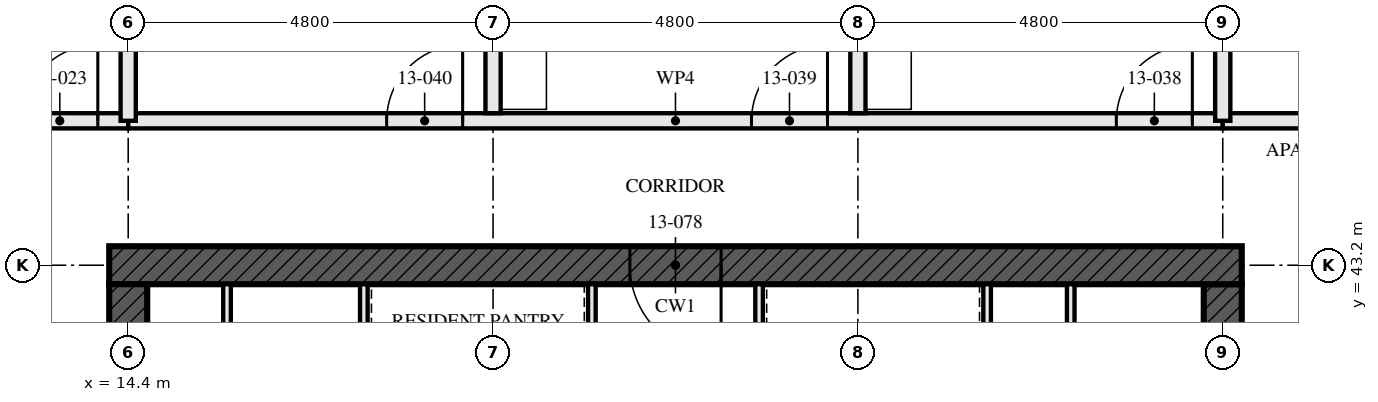
"""IFC4 building model, lengths in metres.
Left out: names, types, materials, properties, quantities, classifications, styles, units other than length and angle.
Written with IfcOpenShell. Run it as: python <this file> out.ifc"""

import sys

from ifc_helpers import new_model, si_unit, direction, frame, frame_2d, origin, place, context, subcontext, project, spatial, rectangle, extrude, element, fill, save


model = new_model("IFC4")
c1 = context("Model", 3, precision=1e-05, world=origin(), true_north=direction((0.0, 1.0)))
c2 = subcontext(c1, "Body", "Model", "MODEL_VIEW")
j1 = project(units=[si_unit("LENGTHUNIT", "METRE"), si_unit("PLANEANGLEUNIT", "RADIAN")], contexts=[c1])
p1 = place(None, origin())
s1 = spatial("IfcSite", under=j1, at=p1, CompositionType="ELEMENT")
p2 = place(p1, origin())
s2 = spatial("IfcBuilding", under=s1, at=p2, CompositionType="ELEMENT")
p3 = place(p2, frame((0.0, 0.0, 51.5)))
s3 = spatial("IfcBuildingStorey", under=s2, at=p3, CompositionType="ELEMENT", Elevation=51.5)
p4 = place(p3, frame((29.05, 43.2, -0.17), z_axis=(0.0, 0.0, 1.0), x_axis=(-1.0, 0.0, 0.0)))
e1 = element("IfcWall", 1, at=p4, inside=s3, PredefinedType="SHEAR", context=c2, shape_type="SweptSolid", body=[
    extrude(rectangle(XDim=14.9, YDim=0.5, at=frame_2d((7.45, 0.0))), origin(), (0.0, 0.0, 1.0), 3.5),
])
p5 = place(p4, frame((6.85, 0.0, 0.17)))
e2 = element("IfcOpeningElement", 2, at=p5, cuts=e1, PredefinedType="OPENING", context=c2, shape_type="SweptSolid", body=[
    extrude(rectangle(XDim=1.2, YDim=2.1, at=frame_2d((0.6, 1.05))), frame((0.0, 0.26, 0.0), z_axis=(0.0, -1.0, 0.0), x_axis=(1.0, 0.0, 0.0)), (0.0, 0.0, 1.0), 0.521),
])
p6 = place(p3, frame((14.4, 42.95, -0.17), z_axis=(0.0, 0.0, 1.0), x_axis=(0.0, -1.0, 0.0)))
e3 = element("IfcWall", 3, at=p6, inside=s3, PredefinedType="SHEAR", context=c2, shape_type="SweptSolid", body=[
    extrude(rectangle(XDim=13.9, YDim=0.5, at=frame_2d((6.95, 0.0))), origin(), (0.0, 0.0, 1.0), 3.5),
])
p7 = place(p6, frame((6.35, 0.0, 0.17)))
e4 = element("IfcOpeningElement", 4, at=p7, cuts=e3, PredefinedType="OPENING", context=c2, shape_type="SweptSolid", body=[
    extrude(rectangle(XDim=1.2, YDim=2.1, at=frame_2d((0.6, 1.05))), frame((0.0, 0.26, 0.0), z_axis=(0.0, -1.0, 0.0), x_axis=(1.0, 0.0, 0.0)), (0.0, 0.0, 1.0), 0.521),
])
p8 = place(p3, frame((28.8, 29.05, -0.17), z_axis=(0.0, 0.0, 1.0), x_axis=(0.0, 1.0, 0.0)))
e5 = element("IfcWall", 5, at=p8, inside=s3, PredefinedType="SHEAR", context=c2, shape_type="SweptSolid", body=[
    extrude(rectangle(XDim=13.9, YDim=0.5, at=frame_2d((6.95, 0.0))), origin(), (0.0, 0.0, 1.0), 3.5),
])
p9 = place(p8, frame((6.35, 0.0, 0.17)))
e6 = element("IfcOpeningElement", 6, at=p9, cuts=e5, PredefinedType="OPENING", context=c2, shape_type="SweptSolid", body=[
    extrude(rectangle(XDim=1.2, YDim=2.1, at=frame_2d((0.6, 1.05))), frame((0.0, 0.26, 0.0), z_axis=(0.0, -1.0, 0.0), x_axis=(1.0, 0.0, 0.0)), (0.0, 0.0, 1.0), 0.521),
])
p10 = place(p3, frame((14.4, 45.1, 0.0), z_axis=(0.0, 0.0, 1.0), x_axis=(-1.0, 0.0, 0.0)))
e7 = element("IfcWall", 7, at=p10, inside=s3, PredefinedType="PARTITIONING", context=c2, shape_type="SweptSolid", body=[
    extrude(rectangle(XDim=9.6, YDim=0.2, at=frame_2d((4.8, 0.0))), origin(), (0.0, 0.0, 1.0), 3.33),
])
p11 = place(p10, frame((0.4, 0.0, 0.0)))
e8 = element("IfcOpeningElement", 8, at=p11, cuts=e7, PredefinedType="OPENING", context=c2, shape_type="SweptSolid", body=[
    extrude(rectangle(XDim=1.0, YDim=2.1, at=frame_2d((0.5, 1.05))), frame((0.0, 0.111, 0.0), z_axis=(0.0, -1.0, 0.0), x_axis=(1.0, 0.0, 0.0)), (0.0, 0.0, 1.0), 0.221),
])
for number, where, z_axis, x_axis in (
    (9, (24.0, 57.28, 0.0), (0.0, 0.0, 1.0), (0.0, -1.0, 0.0)),
    (10, (19.2, 57.28, 0.0), (0.0, 0.0, 1.0), (0.0, -1.0, 0.0)),
):
    element("IfcWall", number, at=place(p3, frame(where, z_axis=z_axis, x_axis=x_axis)), inside=s3, PredefinedType="PARTITIONING", context=c2, shape_type="SweptSolid", body=[
        extrude(rectangle(XDim=12.08, YDim=0.2, at=frame_2d((6.04, 0.0))), origin(), (0.0, 0.0, 1.0), 2.55),
    ])
p12 = place(p3, frame((28.8, 45.1, 0.0), z_axis=(0.0, 0.0, 1.0), x_axis=(-1.0, 0.0, 0.0)))
e11 = element("IfcWall", 11, at=p12, inside=s3, PredefinedType="PARTITIONING", context=c2, shape_type="SweptSolid", body=[
    extrude(rectangle(XDim=14.4, YDim=0.2, at=frame_2d((7.2, 0.0))), origin(), (0.0, 0.0, 1.0), 3.33),
])
p13 = place(p12, frame((0.4, 0.0, 0.0)))
e12 = element("IfcOpeningElement", 12, at=p13, cuts=e11, PredefinedType="OPENING", context=c2, shape_type="SweptSolid", body=[
    extrude(rectangle(XDim=1.0, YDim=2.1, at=frame_2d((0.5, 1.05))), frame((0.0, 0.111, 0.0), z_axis=(0.0, -1.0, 0.0), x_axis=(1.0, 0.0, 0.0)), (0.0, 0.0, 1.0), 0.221),
])
p14 = place(p12, frame((5.2, 0.0, 0.0)))
e13 = element("IfcOpeningElement", 13, at=p14, cuts=e11, PredefinedType="OPENING", context=c2, shape_type="SweptSolid", body=[
    extrude(rectangle(XDim=1.0, YDim=2.1, at=frame_2d((0.5, 1.05))), frame((0.0, 0.111, 0.0), z_axis=(0.0, -1.0, 0.0), x_axis=(1.0, 0.0, 0.0)), (0.0, 0.0, 1.0), 0.221),
])
p15 = place(p12, frame((10.0, 0.0, 0.0)))
e14 = element("IfcOpeningElement", 14, at=p15, cuts=e11, PredefinedType="OPENING", context=c2, shape_type="SweptSolid", body=[
    extrude(rectangle(XDim=1.0, YDim=2.1, at=frame_2d((0.5, 1.05))), frame((0.0, 0.111, 0.0), z_axis=(0.0, -1.0, 0.0), x_axis=(1.0, 0.0, 0.0)), (0.0, 0.0, 1.0), 0.221),
])
p16 = place(p3, frame((38.4, 45.1, 0.0), z_axis=(0.0, 0.0, 1.0), x_axis=(-1.0, 0.0, 0.0)))
e15 = element("IfcWall", 15, at=p16, inside=s3, PredefinedType="PARTITIONING", context=c2, shape_type="SweptSolid", body=[
    extrude(rectangle(XDim=9.6, YDim=0.2, at=frame_2d((4.8, 0.0))), origin(), (0.0, 0.0, 1.0), 3.33),
])
p17 = place(p16, frame((0.4, 0.0, 0.0)))
e16 = element("IfcOpeningElement", 16, at=p17, cuts=e15, PredefinedType="OPENING", context=c2, shape_type="SweptSolid", body=[
    extrude(rectangle(XDim=1.0, YDim=2.1, at=frame_2d((0.5, 1.05))), frame((0.0, 0.111, 0.0), z_axis=(0.0, -1.0, 0.0), x_axis=(1.0, 0.0, 0.0)), (0.0, 0.0, 1.0), 0.221),
])
for number, where, z_axis, x_axis in (
    (17, (15.7, 37.15, 0.0), (0.0, 0.0, 1.0), (0.0, 1.0, 0.0)),
    (18, (26.8, 37.15, 0.0), (0.0, 0.0, 1.0), (0.0, 1.0, 0.0)),
):
    element("IfcWall", number, at=place(p3, frame(where, z_axis=z_axis, x_axis=x_axis)), inside=s3, PredefinedType="SOLIDWALL", context=c2, shape_type="SweptSolid", body=[
        extrude(rectangle(XDim=5.8, YDim=0.1, at=frame_2d((2.9, 0.0))), origin(), (0.0, 0.0, 1.0), 3.33),
    ])
p18 = place(p3, frame((20.5, 37.15, 0.0), z_axis=(0.0, 0.0, 1.0), x_axis=(0.0, 1.0, 0.0)))
e19 = element("IfcWall", 19, at=p18, inside=s3, PredefinedType="SOLIDWALL", context=c2, shape_type="SweptSolid", body=[
    extrude(rectangle(XDim=5.8, YDim=0.1, at=frame_2d((2.9, 0.0))), origin(), (0.0, 0.0, 1.0), 3.33),
])
p19 = place(p18, frame((0.925, 0.0, 0.0)))
e20 = element("IfcOpeningElement", 20, at=p19, cuts=e19, PredefinedType="OPENING", context=c2, shape_type="SweptSolid", body=[
    extrude(rectangle(XDim=1.0, YDim=2.1, at=frame_2d((0.5, 1.05))), frame((0.0, 0.061, 0.0), z_axis=(0.0, -1.0, 0.0), x_axis=(1.0, 0.0, 0.0)), (0.0, 0.0, 1.0), 0.121),
])
p20 = place(p18, frame((3.9, 0.0, 0.0)))
e21 = element("IfcOpeningElement", 21, at=p20, cuts=e19, PredefinedType="OPENING", context=c2, shape_type="SweptSolid", body=[
    extrude(rectangle(XDim=1.0, YDim=2.1, at=frame_2d((0.5, 1.05))), frame((0.0, 0.061, 0.0), z_axis=(0.0, -1.0, 0.0), x_axis=(1.0, 0.0, 0.0)), (0.0, 0.0, 1.0), 0.121),
])
for number, where, z_axis, x_axis in (
    (22, (22.7, 37.15, 0.0), (0.0, 0.0, 1.0), (0.0, 1.0, 0.0)),
    (23, (17.5, 37.15, 0.0), (0.0, 0.0, 1.0), (0.0, 1.0, 0.0)),
    (24, (25.7, 37.15, 0.0), (0.0, 0.0, 1.0), (0.0, 1.0, 0.0)),
):
    element("IfcWall", number, at=place(p3, frame(where, z_axis=z_axis, x_axis=x_axis)), inside=s3, PredefinedType="SOLIDWALL", context=c2, shape_type="SweptSolid", body=[
        extrude(rectangle(XDim=5.8, YDim=0.1, at=frame_2d((2.9, 0.0))), origin(), (0.0, 0.0, 1.0), 3.33),
    ])
for number, where, z_axis, x_axis in (
    (25, (14.4, 45.1, 0.0), (0.0, 0.0, 1.0), (0.0, 1.0, 0.0)),
    (26, (28.8, 45.1, 0.0), (0.0, 0.0, 1.0), (0.0, 1.0, 0.0)),
):
    element("IfcWall", number, at=place(p3, frame(where, z_axis=z_axis, x_axis=x_axis)), inside=s3, PredefinedType="PARTITIONING", context=c2, shape_type="SweptSolid", body=[
        extrude(rectangle(XDim=2.555, YDim=0.2, at=frame_2d((1.277, 0.0))), origin(), (0.0, 0.0, 1.0), 2.32),
    ])
p21 = place(p11, frame((1.0, 0.0, 0.0), z_axis=(0.0, 0.0, 1.0), x_axis=(-1.0, 0.0, 0.0)))
e27 = element("IfcDoor", 27, at=p21, inside=s3, OperationType="SINGLE_SWING_LEFT", PredefinedType="DOOR", context=c2, shape_type="SweptSolid", body=[
    extrude(rectangle(XDim=1.0, YDim=2.1, at=frame_2d((0.5, 1.05))), frame((0.0, 0.027, 0.0), z_axis=(0.0, -1.0, 0.0), x_axis=(1.0, 0.0, 0.0)), (0.0, 0.0, 1.0), 0.054),
])
fill(e8, e27)
p22 = place(p13, frame((1.0, 0.0, 0.0), z_axis=(0.0, 0.0, 1.0), x_axis=(-1.0, 0.0, 0.0)))
e28 = element("IfcDoor", 28, at=p22, inside=s3, OperationType="SINGLE_SWING_LEFT", PredefinedType="DOOR", context=c2, shape_type="SweptSolid", body=[
    extrude(rectangle(XDim=1.0, YDim=2.1, at=frame_2d((0.5, 1.05))), frame((0.0, 0.027, 0.0), z_axis=(0.0, -1.0, 0.0), x_axis=(1.0, 0.0, 0.0)), (0.0, 0.0, 1.0), 0.054),
])
fill(e12, e28)
p23 = place(p14, frame((1.0, 0.0, 0.0), z_axis=(0.0, 0.0, 1.0), x_axis=(-1.0, 0.0, 0.0)))
e29 = element("IfcDoor", 29, at=p23, inside=s3, OperationType="SINGLE_SWING_LEFT", PredefinedType="DOOR", context=c2, shape_type="SweptSolid", body=[
    extrude(rectangle(XDim=1.0, YDim=2.1, at=frame_2d((0.5, 1.05))), frame((0.0, 0.027, 0.0), z_axis=(0.0, -1.0, 0.0), x_axis=(1.0, 0.0, 0.0)), (0.0, 0.0, 1.0), 0.054),
])
fill(e13, e29)
p24 = place(p15, frame((1.0, 0.0, 0.0), z_axis=(0.0, 0.0, 1.0), x_axis=(-1.0, 0.0, 0.0)))
e30 = element("IfcDoor", 30, at=p24, inside=s3, OperationType="SINGLE_SWING_LEFT", PredefinedType="DOOR", context=c2, shape_type="SweptSolid", body=[
    extrude(rectangle(XDim=1.0, YDim=2.1, at=frame_2d((0.5, 1.05))), frame((0.0, 0.027, 0.0), z_axis=(0.0, -1.0, 0.0), x_axis=(1.0, 0.0, 0.0)), (0.0, 0.0, 1.0), 0.054),
])
fill(e14, e30)
p25 = place(p5, origin())
e31 = element("IfcDoor", 31, at=p25, inside=s3, OperationType="SINGLE_SWING_LEFT", PredefinedType="DOOR", context=c2, shape_type="SweptSolid", body=[
    extrude(rectangle(XDim=1.2, YDim=2.1, at=frame_2d((0.6, 1.05))), frame((0.0, 0.027, 0.0), z_axis=(0.0, -1.0, 0.0), x_axis=(1.0, 0.0, 0.0)), (0.0, 0.0, 1.0), 0.054),
])
fill(e2, e31)
save(model, sys.argv[1])
